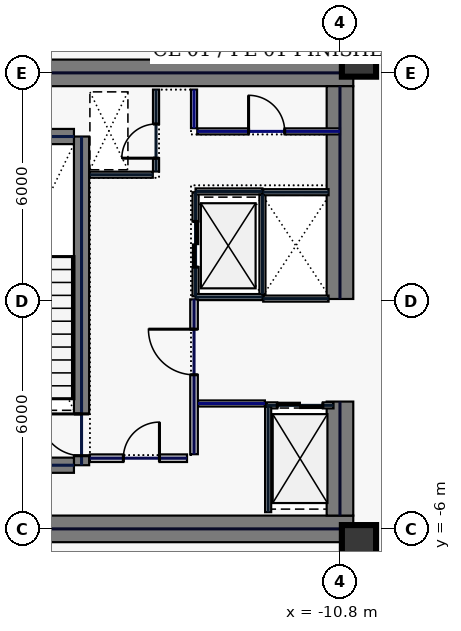
"""IFC4 building model, lengths in metres.
Left out: names, types, materials, properties, quantities, classifications, styles, units other than length and angle.
Written with IfcOpenShell. Run it as: python <this file> out.ifc"""

import sys

from ifc_helpers import new_model, si_unit, direction, frame, frame_2d, origin, origin_2d, place, context, subcontext, project, spatial, rectangle, hollow_rectangle, extrude, element, fill, save


model = new_model("IFC4")
c1 = context("Model", 3, precision=1e-05, world=origin(), true_north=direction((0.0, 1.0)))
c2 = subcontext(c1, "Body", "Model", "MODEL_VIEW")
j1 = project(units=[si_unit("LENGTHUNIT", "METRE"), si_unit("PLANEANGLEUNIT", "RADIAN")], contexts=[c1])
p1 = place(None, origin())
s1 = spatial("IfcSite", under=j1, at=p1, CompositionType="ELEMENT")
p2 = place(p1, origin())
s2 = spatial("IfcBuilding", under=s1, at=p2, CompositionType="ELEMENT")
p3 = place(p2, frame((0.0, 0.0, 172.2)))
s3 = spatial("IfcBuildingStorey", under=s2, at=p3, CompositionType="ELEMENT", Elevation=172.2)
for number, where, z_axis, x_axis in (
    (1, (-22.0, 6.0, 0.0), (0.0, 0.0, 1.0), (1.0, 0.0, 0.0)),
    (2, (-22.0, -6.0, 0.0), (0.0, 0.0, 1.0), (1.0, 0.0, 0.0)),
):
    element("IfcWall", number, at=place(p3, frame(where, z_axis=z_axis, x_axis=x_axis)), inside=s3, PredefinedType="SHEAR", context=c2, shape_type="SweptSolid", body=[
        extrude(rectangle(XDim=11.55, YDim=0.7, at=frame_2d((5.775, 0.0))), origin(), (0.0, 0.0, 1.0), 3.74),
    ])
p4 = place(p3, frame((-10.8, -5.65, 0.0), z_axis=(0.0, 0.0, 1.0), x_axis=(0.0, 1.0, 0.0)))
e3 = element("IfcWall", 3, at=p4, inside=s3, PredefinedType="SHEAR", context=c2, shape_type="SweptSolid", body=[
    extrude(rectangle(XDim=3.0, YDim=0.7, at=frame_2d((1.5, 0.0))), origin(), (0.0, 0.0, 1.0), 3.74),
])
p5 = place(p3, frame((-10.8, 0.05, 0.0), z_axis=(0.0, 0.0, 1.0), x_axis=(0.0, 1.0, 0.0)))
e4 = element("IfcWall", 4, at=p5, inside=s3, PredefinedType="SHEAR", context=c2, shape_type="SweptSolid", body=[
    extrude(rectangle(XDim=5.6, YDim=0.7, at=frame_2d((2.8, 0.0))), origin(), (0.0, 0.0, 1.0), 3.74),
])
p6 = place(p3, frame((-17.6, -4.325, 0.0), z_axis=(0.0, 0.0, 1.0), x_axis=(0.0, 1.0, 0.0)))
e5 = element("IfcWall", 5, at=p6, inside=s3, PredefinedType="SHEAR", context=c2, shape_type="SweptSolid", body=[
    extrude(rectangle(XDim=8.65, YDim=0.4, at=frame_2d((4.325, 0.0))), origin(), (0.0, 0.0, 1.0), 3.74),
])
p7 = place(p6, frame((0.25, 0.0, 0.0)))
e6 = element("IfcOpeningElement", 6, at=p7, cuts=e5, PredefinedType="OPENING", context=c2, shape_type="SweptSolid", body=[
    extrude(rectangle(XDim=1.1, YDim=2.2, at=frame_2d((0.55, 1.1))), frame((0.0, 0.21, 0.0), z_axis=(0.0, -1.0, 0.0), x_axis=(1.0, 0.0, 0.0)), (0.0, 0.0, 1.0), 0.42),
])
for number, where, z_axis, x_axis in (
    (7, (-21.2, -4.325, 0.0), (0.0, 0.0, 1.0), (1.0, 0.0, 0.0)),
    (8, (-21.2, 4.325, 0.0), (0.0, 0.0, 1.0), (1.0, 0.0, 0.0)),
):
    element("IfcWall", number, at=place(p3, frame(where, z_axis=z_axis, x_axis=x_axis)), inside=s3, PredefinedType="SHEAR", context=c2, shape_type="SweptSolid", body=[
        extrude(rectangle(XDim=3.4, YDim=0.4, at=frame_2d((1.7, 0.0))), origin(), (0.0, 0.0, 1.0), 3.74),
    ])
for number, where, z_axis, x_axis in (
    (9, (-10.3, -6.35, 0.0), (0.0, 0.0, 1.0), (1.0, 0.0, 0.0)),
    (10, (-10.3, 6.35, 0.0), (0.0, 0.0, 1.0), (1.0, 0.0, 0.0)),
):
    element("IfcColumn", number, at=place(p3, frame(where, z_axis=z_axis, x_axis=x_axis)), inside=s3, PredefinedType="COLUMN", context=c2, shape_type="SweptSolid", body=[
        extrude(hollow_rectangle(XDim=0.9, YDim=0.9, WallThickness=0.04, at=origin_2d()), origin(), (0.0, 0.0, 1.0), 3.74),
    ])
p8 = place(p3, frame((-14.6, 0.12, 0.0), z_axis=(0.0, 0.0, 1.0), x_axis=(0.0, 1.0, 0.0)))
e11 = element("IfcWall", 11, at=p8, inside=s3, PredefinedType="PARTITIONING", context=c2, shape_type="SweptSolid", body=[
    extrude(rectangle(XDim=2.74, YDim=0.16, at=frame_2d((1.37, 0.0))), origin(), (0.0, 0.0, 1.0), 3.74),
])
p9 = place(p8, frame((0.77, 0.0, 0.0)))
e12 = element("IfcOpeningElement", 12, at=p9, cuts=e11, PredefinedType="OPENING", context=c2, shape_type="SweptSolid", body=[
    extrude(rectangle(XDim=1.2, YDim=2.2, at=frame_2d((0.6, 1.1))), frame((0.0, 0.09, 0.0), z_axis=(0.0, -1.0, 0.0), x_axis=(1.0, 0.0, 0.0)), (0.0, 0.0, 1.0), 0.18),
])
for number, where, z_axis, x_axis in (
    (13, (-14.6, 0.1, 0.0), (0.0, 0.0, 1.0), (1.0, 0.0, 0.0)),
    (14, (-14.6, 2.88, 0.0), (0.0, 0.0, 1.0), (1.0, 0.0, 0.0)),
):
    element("IfcWall", number, at=place(p3, frame(where, z_axis=z_axis, x_axis=x_axis)), inside=s3, PredefinedType="PARTITIONING", context=c2, shape_type="SweptSolid", body=[
        extrude(rectangle(XDim=1.76, YDim=0.16, at=frame_2d((0.88, 0.0))), origin(), (0.0, 0.0, 1.0), 3.74),
    ])
p10 = place(p3, frame((-12.84, 0.18, 0.0), z_axis=(0.0, 0.0, 1.0), x_axis=(0.0, 1.0, 0.0)))
e15 = element("IfcWall", 15, at=p10, inside=s3, PredefinedType="PARTITIONING", context=c2, shape_type="SweptSolid", body=[
    extrude(rectangle(XDim=2.62, YDim=0.16, at=frame_2d((1.31, 0.0))), origin(), (0.0, 0.0, 1.0), 3.74),
])
p11 = place(p3, frame((-12.73, -2.75, 0.0), z_axis=(0.0, 0.0, 1.0), x_axis=(1.0, 0.0, 0.0)))
e16 = element("IfcWall", 16, at=p11, inside=s3, PredefinedType="PARTITIONING", context=c2, shape_type="SweptSolid", body=[
    extrude(rectangle(XDim=1.76, YDim=0.16, at=frame_2d((0.88, 0.0))), origin(), (0.0, 0.0, 1.0), 3.74),
])
p12 = place(p11, frame((0.28, 0.0, 0.0)))
e17 = element("IfcOpeningElement", 17, at=p12, cuts=e16, PredefinedType="OPENING", context=c2, shape_type="SweptSolid", body=[
    extrude(rectangle(XDim=1.2, YDim=2.2, at=frame_2d((0.6, 1.1))), frame((0.0, 0.09, 0.0), z_axis=(0.0, -1.0, 0.0), x_axis=(1.0, 0.0, 0.0)), (0.0, 0.0, 1.0), 0.18),
])
for number, where, z_axis, x_axis in (
    (18, (-12.82, 0.06, 0.0), (0.0, 0.0, 1.0), (1.0, 0.0, 0.0)),
    (19, (-12.82, 2.86, 0.0), (0.0, 0.0, 1.0), (1.0, 0.0, 0.0)),
):
    element("IfcWall", number, at=place(p3, frame(where, z_axis=z_axis, x_axis=x_axis)), inside=s3, PredefinedType="PARTITIONING", context=c2, shape_type="SweptSolid", body=[
        extrude(rectangle(XDim=1.72, YDim=0.16, at=frame_2d((0.86, 0.0))), origin(), (0.0, 0.0, 1.0), 3.74),
    ])
p13 = place(p3, frame((-15.64, 3.405, 0.0), z_axis=(0.0, 0.0, 1.0), x_axis=(0.0, 1.0, 0.0)))
e20 = element("IfcWall", 20, at=p13, inside=s3, PredefinedType="PARTITIONING", context=c2, shape_type="SweptSolid", body=[
    extrude(rectangle(XDim=2.155, YDim=0.16, at=frame_2d((1.078, 0.0))), origin(), (0.0, 0.0, 1.0), 3.74),
])
p14 = place(p13, frame((0.35, 0.0, 0.0)))
e21 = element("IfcOpeningElement", 21, at=p14, cuts=e20, PredefinedType="OPENING", context=c2, shape_type="SweptSolid", body=[
    extrude(rectangle(XDim=0.9, YDim=2.2, at=frame_2d((0.45, 1.1))), frame((0.0, 0.09, 0.0), z_axis=(0.0, -1.0, 0.0), x_axis=(1.0, 0.0, 0.0)), (0.0, 0.0, 1.0), 0.18),
])
p15 = place(p3, frame((-17.38, 3.32, 0.0), z_axis=(0.0, 0.0, 1.0), x_axis=(1.0, 0.0, 0.0)))
e22 = element("IfcWall", 22, at=p15, inside=s3, PredefinedType="PARTITIONING", context=c2, shape_type="SweptSolid", body=[
    extrude(rectangle(XDim=1.655, YDim=0.16, at=frame_2d((0.827, 0.0))), origin(), (0.0, 0.0, 1.0), 3.74),
])
p16 = place(p3, frame((-17.38, -4.14, 0.0), z_axis=(0.0, 0.0, 1.0), x_axis=(1.0, 0.0, 0.0)))
e23 = element("IfcWall", 23, at=p16, inside=s3, PredefinedType="SOLIDWALL", context=c2, shape_type="SweptSolid", body=[
    extrude(rectangle(XDim=2.555, YDim=0.2, at=frame_2d((1.277, 0.0))), origin(), (0.0, 0.0, 1.0), 3.74),
])
p17 = place(p16, frame((0.88, 0.0, 0.0)))
e24 = element("IfcOpeningElement", 24, at=p17, cuts=e23, PredefinedType="OPENING", context=c2, shape_type="SweptSolid", body=[
    extrude(rectangle(XDim=0.95, YDim=2.2, at=frame_2d((0.475, 1.1))), frame((0.0, 0.11, 0.0), z_axis=(0.0, -1.0, 0.0), x_axis=(1.0, 0.0, 0.0)), (0.0, 0.0, 1.0), 0.22),
])
p18 = place(p3, frame((-14.535, -2.7, 0.0), z_axis=(0.0, 0.0, 1.0), x_axis=(1.0, 0.0, 0.0)))
e25 = element("IfcWall", 25, at=p18, inside=s3, PredefinedType="PARTITIONING", context=c2, shape_type="SweptSolid", body=[
    extrude(rectangle(XDim=1.76, YDim=0.16, at=frame_2d((0.88, 0.0))), origin(), (0.0, 0.0, 1.0), 3.74),
])
p19 = place(p3, frame((-12.69, -5.56, 0.0), z_axis=(0.0, 0.0, 1.0), x_axis=(0.0, 1.0, 0.0)))
e26 = element("IfcWall", 26, at=p19, inside=s3, PredefinedType="PARTITIONING", context=c2, shape_type="SweptSolid", body=[
    extrude(rectangle(XDim=2.775, YDim=0.16, at=frame_2d((1.388, 0.0))), origin(), (0.0, 0.0, 1.0), 3.74),
])
p20 = place(p3, frame((-14.555, 4.46, 0.0), z_axis=(0.0, 0.0, 1.0), x_axis=(1.0, 0.0, 0.0)))
e27 = element("IfcWall", 27, at=p20, inside=s3, PredefinedType="PARTITIONING", context=c2, shape_type="SweptSolid", body=[
    extrude(rectangle(XDim=3.755, YDim=0.16, at=frame_2d((1.877, 0.0))), origin(), (0.0, 0.0, 1.0), 3.74),
])
p21 = place(p20, frame((1.35, 0.0, 0.0)))
e28 = element("IfcOpeningElement", 28, at=p21, cuts=e27, PredefinedType="OPENING", context=c2, shape_type="SweptSolid", body=[
    extrude(rectangle(XDim=0.95, YDim=2.2, at=frame_2d((0.475, 1.1))), frame((0.0, 0.09, 0.0), z_axis=(0.0, -1.0, 0.0), x_axis=(1.0, 0.0, 0.0)), (0.0, 0.0, 1.0), 0.18),
])
p22 = place(p3, frame((-14.64, 4.545, 0.0), z_axis=(0.0, 0.0, 1.0), x_axis=(0.0, 1.0, 0.0)))
e29 = element("IfcWall", 29, at=p22, inside=s3, PredefinedType="PARTITIONING", context=c2, shape_type="SweptSolid", body=[
    extrude(rectangle(XDim=1.015, YDim=0.16, at=frame_2d((0.508, 0.0))), origin(), (0.0, 0.0, 1.0), 3.74),
])
p23 = place(p3, frame((-14.64, -4.035, 0.0), z_axis=(0.0, 0.0, 1.0), x_axis=(0.0, 1.0, 0.0)))
e30 = element("IfcWall", 30, at=p23, inside=s3, PredefinedType="SOLIDWALL", context=c2, shape_type="SweptSolid", body=[
    extrude(rectangle(XDim=4.075, YDim=0.2, at=frame_2d((2.038, 0.0))), origin(), (0.0, 0.0, 1.0), 3.74),
])
p24 = place(p23, frame((2.09, 0.0, 0.0)))
e31 = element("IfcOpeningElement", 31, at=p24, cuts=e30, PredefinedType="OPENING", context=c2, shape_type="SweptSolid", body=[
    extrude(rectangle(XDim=1.2, YDim=2.2, at=frame_2d((0.6, 1.1))), frame((0.0, 0.11, 0.0), z_axis=(0.0, -1.0, 0.0), x_axis=(1.0, 0.0, 0.0)), (0.0, 0.0, 1.0), 0.22),
])
p25 = place(p3, frame((-10.63, -7.335, 0.0), z_axis=(0.0, 0.0, 1.0), x_axis=(0.0, 1.0, 0.0)))
e32 = element("IfcWall", 32, at=p25, inside=s3, PredefinedType="PARTITIONING", context=c2, shape_type="SweptSolid", body=[
    extrude(rectangle(XDim=0.915, YDim=0.16, at=frame_2d((0.458, 0.0))), origin(), (0.0, 0.0, 1.0), 3.74),
])
p26 = place(p3, frame((-10.63, 6.42, 0.0), z_axis=(0.0, 0.0, 1.0), x_axis=(0.0, 1.0, 0.0)))
e33 = element("IfcWall", 33, at=p26, inside=s3, PredefinedType="PARTITIONING", context=c2, shape_type="SweptSolid", body=[
    extrude(rectangle(XDim=1.015, YDim=0.16, at=frame_2d((0.508, 0.0))), origin(), (0.0, 0.0, 1.0), 3.74),
])
p27 = place(p7, origin())
e34 = element("IfcDoor", 34, at=p27, inside=s3, OperationType="SINGLE_SWING_RIGHT", PredefinedType="DOOR", context=c2, shape_type="SweptSolid", body=[
    extrude(rectangle(XDim=1.1, YDim=2.2, at=frame_2d((0.55, 1.1))), frame((0.0, 0.025, 0.0), z_axis=(0.0, -1.0, 0.0), x_axis=(1.0, 0.0, 0.0)), (0.0, 0.0, 1.0), 0.05),
])
fill(e6, e34)
p28 = place(p9, origin())
e35 = element("IfcDoor", 35, at=p28, inside=s3, OperationType="SLIDING_TO_LEFT", PredefinedType="DOOR", context=c2, shape_type="SweptSolid", body=[
    extrude(rectangle(XDim=1.2, YDim=2.2, at=frame_2d((0.6, 1.1))), frame((0.0, 0.025, 0.0), z_axis=(0.0, -1.0, 0.0), x_axis=(1.0, 0.0, 0.0)), (0.0, 0.0, 1.0), 0.05),
])
fill(e12, e35)
p29 = place(p12, origin())
e36 = element("IfcDoor", 36, at=p29, inside=s3, OperationType="SLIDING_TO_LEFT", PredefinedType="DOOR", context=c2, shape_type="SweptSolid", body=[
    extrude(rectangle(XDim=1.2, YDim=2.2, at=frame_2d((0.6, 1.1))), frame((0.0, 0.025, 0.0), z_axis=(0.0, -1.0, 0.0), x_axis=(1.0, 0.0, 0.0)), (0.0, 0.0, 1.0), 0.05),
])
fill(e17, e36)
p30 = place(p14, origin())
e37 = element("IfcDoor", 37, at=p30, inside=s3, OperationType="SINGLE_SWING_LEFT", PredefinedType="DOOR", context=c2, shape_type="SweptSolid", body=[
    extrude(rectangle(XDim=0.9, YDim=2.2, at=frame_2d((0.45, 1.1))), frame((0.0, 0.025, 0.0), z_axis=(0.0, -1.0, 0.0), x_axis=(1.0, 0.0, 0.0)), (0.0, 0.0, 1.0), 0.05),
])
fill(e21, e37)
p31 = place(p17, origin())
e38 = element("IfcDoor", 38, at=p31, inside=s3, OperationType="SINGLE_SWING_RIGHT", PredefinedType="DOOR", context=c2, shape_type="SweptSolid", body=[
    extrude(rectangle(XDim=0.95, YDim=2.2, at=frame_2d((0.475, 1.1))), frame((0.0, 0.025, 0.0), z_axis=(0.0, -1.0, 0.0), x_axis=(1.0, 0.0, 0.0)), (0.0, 0.0, 1.0), 0.05),
])
fill(e24, e38)
p32 = place(p21, origin())
e39 = element("IfcDoor", 39, at=p32, inside=s3, OperationType="SINGLE_SWING_LEFT", PredefinedType="DOOR", context=c2, shape_type="SweptSolid", body=[
    extrude(rectangle(XDim=0.95, YDim=2.2, at=frame_2d((0.475, 1.1))), frame((0.0, 0.025, 0.0), z_axis=(0.0, -1.0, 0.0), x_axis=(1.0, 0.0, 0.0)), (0.0, 0.0, 1.0), 0.05),
])
fill(e28, e39)
p33 = place(p24, origin())
e40 = element("IfcDoor", 40, at=p33, inside=s3, OperationType="SINGLE_SWING_RIGHT", PredefinedType="DOOR", context=c2, shape_type="SweptSolid", body=[
    extrude(rectangle(XDim=1.2, YDim=2.2, at=frame_2d((0.6, 1.1))), frame((0.0, 0.025, 0.0), z_axis=(0.0, -1.0, 0.0), x_axis=(1.0, 0.0, 0.0)), (0.0, 0.0, 1.0), 0.05),
])
fill(e31, e40)
save(model, sys.argv[1])
